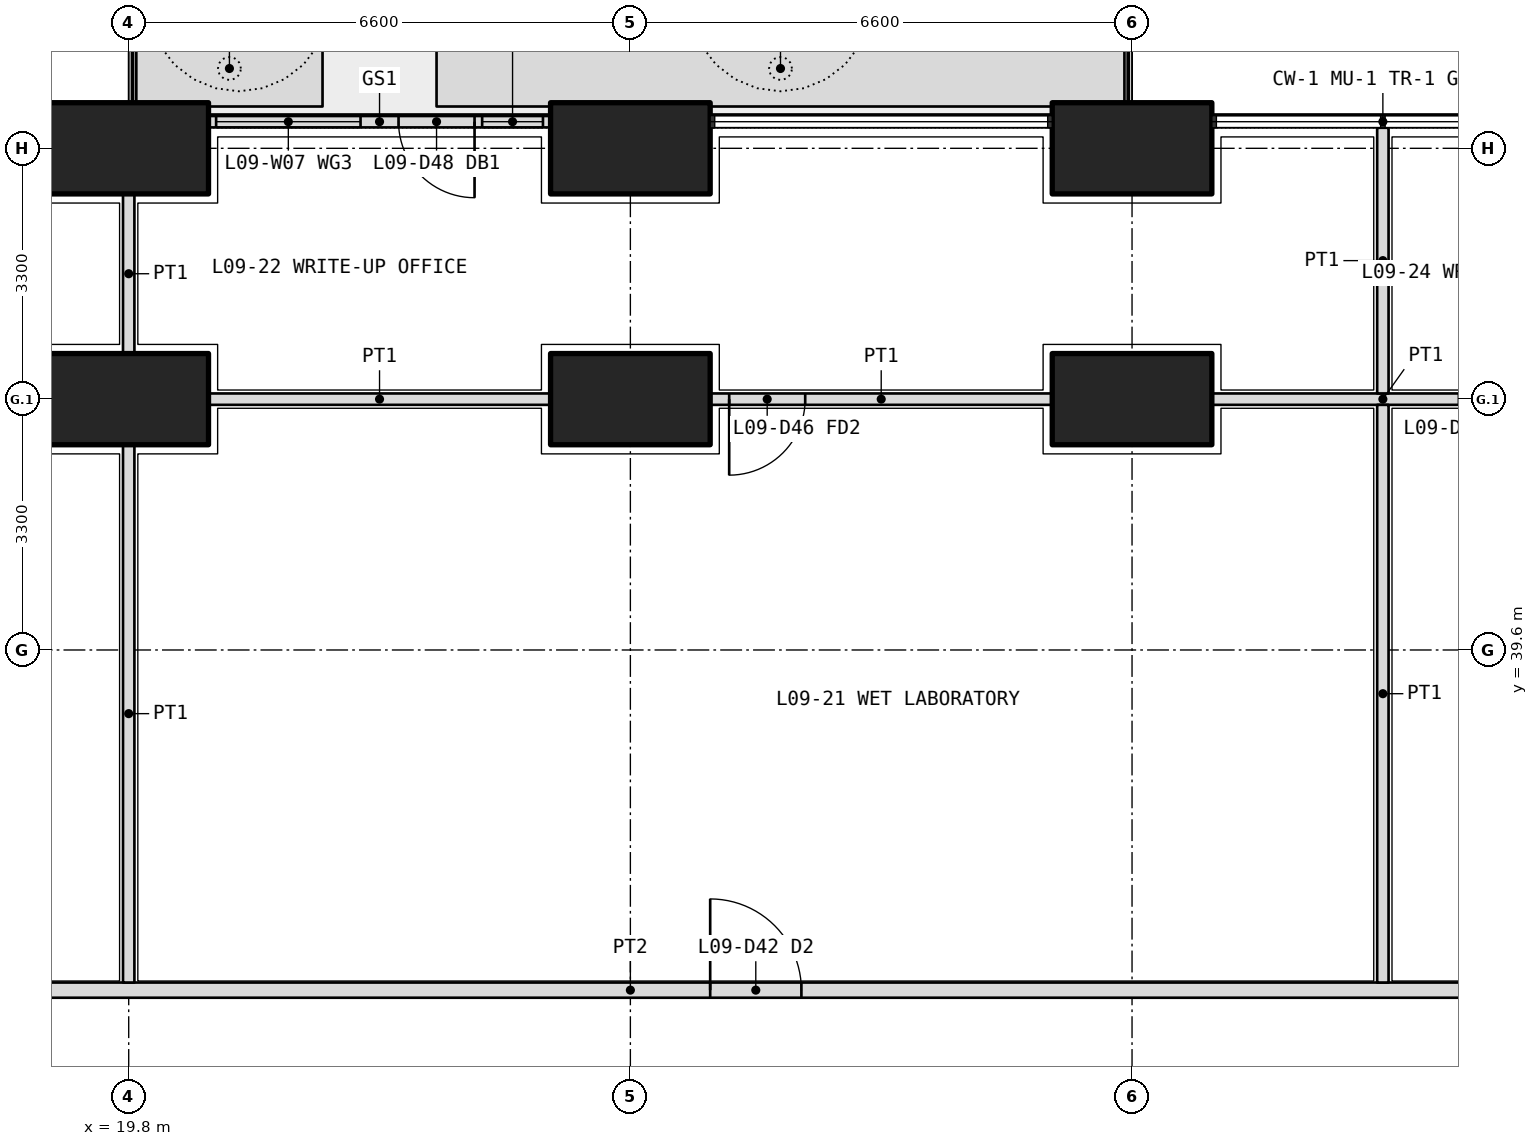
"""IFC4 building model, lengths in metres.
Left out: names, types, materials, properties, quantities, classifications, styles, units other than length and angle.
Written with IfcOpenShell. Run it as: python <this file> out.ifc"""

import sys

from ifc_helpers import new_model, si_unit, direction, frame, frame_2d, origin, origin_2d, place, context, subcontext, project, spatial, polyline, rectangle, outline, extrude, element, fill, save


model = new_model("IFC4")
c1 = context("Model", 3, precision=1e-05, world=origin(), true_north=direction((0.0, 1.0)))
c2 = subcontext(c1, "Body", "Model", "MODEL_VIEW")
j1 = project(units=[si_unit("LENGTHUNIT", "METRE"), si_unit("PLANEANGLEUNIT", "RADIAN")], contexts=[c1])
p1 = place(None, origin())
s1 = spatial("IfcSite", under=j1, at=p1, CompositionType="ELEMENT")
p2 = place(p1, origin())
s2 = spatial("IfcBuilding", under=s1, at=p2, CompositionType="ELEMENT")
p3 = place(p2, frame((0.0, 0.0, 42.3)))
s3 = spatial("IfcBuildingStorey", under=s2, at=p3, CompositionType="ELEMENT", Elevation=42.3)
for number, where, z_axis, x_axis in (
    (1, (19.8, 46.2, 0.0), (0.0, 0.0, 1.0), (1.0, 0.0, 0.0)),
    (2, (26.4, 46.2, 0.0), (0.0, 0.0, 1.0), (1.0, 0.0, 0.0)),
    (3, (33.0, 46.2, 0.0), (0.0, 0.0, 1.0), (1.0, 0.0, 0.0)),
    (4, (19.8, 42.9, 0.0), (0.0, 0.0, 1.0), (1.0, 0.0, 0.0)),
    (5, (26.4, 42.9, 0.0), (0.0, 0.0, 1.0), (1.0, 0.0, 0.0)),
    (6, (33.0, 42.9, 0.0), (0.0, 0.0, 1.0), (1.0, 0.0, 0.0)),
):
    element("IfcColumn", number, at=place(p3, frame(where, z_axis=z_axis, x_axis=x_axis)), inside=s3, PredefinedType="COLUMN", context=c2, shape_type="SweptSolid", body=[
        extrude(rectangle(XDim=2.1, YDim=1.2, at=origin_2d()), origin(), (0.0, 0.0, 1.0), 4.2),
    ])
p4 = place(p3, origin())
e7 = element("IfcWall", 7, at=p4, inside=s3, PredefinedType="USERDEFINED", context=c2, shape_type="SweptSolid", body=[
    extrude(outline(polyline([(19.9, 46.75), (22.35, 46.75), (22.35, 47.75), (19.9, 47.75), (19.9, 46.75)]), holes=[polyline([(20.05, 46.9), (22.2, 46.9), (22.2, 47.6), (20.05, 47.6), (20.05, 46.9)])]), origin(), (0.0, 0.0, 1.0), 1.05),
])
p5 = place(p3, origin())
e8 = element("IfcWall", 8, at=p5, inside=s3, PredefinedType="USERDEFINED", context=c2, shape_type="SweptSolid", body=[
    extrude(outline(polyline([(23.85, 46.75), (32.9, 46.75), (32.9, 47.75), (23.85, 47.75), (23.85, 46.75)]), holes=[polyline([(24.0, 46.9), (32.75, 46.9), (32.75, 47.6), (24.0, 47.6), (24.0, 46.9)])]), origin(), (0.0, 0.0, 1.0), 1.05),
])
p6 = place(p3, frame((25.35, 46.55, 0.0), z_axis=(0.0, 0.0, 1.0), x_axis=(-1.0, 0.0, 0.0)))
e9 = element("IfcWall", 9, at=p6, inside=s3, PredefinedType="SOLIDWALL", context=c2, shape_type="SweptSolid", body=[
    extrude(rectangle(XDim=4.5, YDim=0.15, at=frame_2d((2.25, 0.0))), origin(), (0.0, 0.0, 1.0), 2.7),
])
p7 = place(p6, frame((1.0, 0.0, 0.0)))
e10 = element("IfcOpeningElement", 10, at=p7, cuts=e9, PredefinedType="OPENING", context=c2, shape_type="SweptSolid", body=[
    extrude(rectangle(XDim=1.0, YDim=2.4, at=frame_2d((0.5, 1.2))), frame((0.0, 0.085, 0.0), z_axis=(0.0, -1.0, 0.0), x_axis=(1.0, 0.0, 0.0)), (0.0, 0.0, 1.0), 0.17),
])
p8 = place(p6, frame((0.1, 0.0, 0.1)))
e11 = element("IfcOpeningElement", 11, at=p8, cuts=e9, PredefinedType="OPENING", context=c2, shape_type="SweptSolid", body=[
    extrude(rectangle(XDim=0.8, YDim=2.3, at=frame_2d((0.4, 1.15))), frame((0.0, 0.085, 0.0), z_axis=(0.0, -1.0, 0.0), x_axis=(1.0, 0.0, 0.0)), (0.0, 0.0, 1.0), 0.17),
])
p9 = place(p6, frame((2.5, 0.0, 0.1)))
e12 = element("IfcOpeningElement", 12, at=p9, cuts=e9, PredefinedType="OPENING", context=c2, shape_type="SweptSolid", body=[
    extrude(rectangle(XDim=1.9, YDim=2.3, at=frame_2d((0.95, 1.15))), frame((0.0, 0.085, 0.0), z_axis=(0.0, -1.0, 0.0), x_axis=(1.0, 0.0, 0.0)), (0.0, 0.0, 1.0), 0.17),
])
p10 = place(p3, frame((10.975, 35.125, 0.0), z_axis=(0.0, 0.0, 1.0), x_axis=(1.0, 0.0, 0.0)))
e13 = element("IfcWall", 13, at=p10, inside=s3, PredefinedType="PARTITIONING", context=c2, shape_type="SweptSolid", body=[
    extrude(rectangle(XDim=30.85, YDim=0.2, at=frame_2d((15.425, 0.0))), origin(), (0.0, 0.0, 1.0), 2.85),
])
p11 = place(p10, frame((3.962, 0.0, 0.0)))
e14 = element("IfcOpeningElement", 14, at=p11, cuts=e13, PredefinedType="OPENING", context=c2, shape_type="SweptSolid", body=[
    extrude(rectangle(XDim=1.0, YDim=2.1, at=frame_2d((0.5, 1.05))), frame((0.0, 0.11, 0.0), z_axis=(0.0, -1.0, 0.0), x_axis=(1.0, 0.0, 0.0)), (0.0, 0.0, 1.0), 0.22),
])
p12 = place(p10, frame((16.475, 0.0, 0.0)))
e15 = element("IfcOpeningElement", 15, at=p12, cuts=e13, PredefinedType="OPENING", context=c2, shape_type="SweptSolid", body=[
    extrude(rectangle(XDim=1.2, YDim=2.1, at=frame_2d((0.6, 1.05))), frame((0.0, 0.11, 0.0), z_axis=(0.0, -1.0, 0.0), x_axis=(1.0, 0.0, 0.0)), (0.0, 0.0, 1.0), 0.22),
])
p13 = place(p10, frame((27.438, 0.0, 0.0)))
e16 = element("IfcOpeningElement", 16, at=p13, cuts=e13, PredefinedType="OPENING", context=c2, shape_type="SweptSolid", body=[
    extrude(rectangle(XDim=1.2, YDim=2.1, at=frame_2d((0.6, 1.05))), frame((0.0, 0.11, 0.0), z_axis=(0.0, -1.0, 0.0), x_axis=(1.0, 0.0, 0.0)), (0.0, 0.0, 1.0), 0.22),
])
p14 = place(p3, frame((38.55, 42.9, 0.0), z_axis=(0.0, 0.0, 1.0), x_axis=(-1.0, 0.0, 0.0)))
e17 = element("IfcWall", 17, at=p14, inside=s3, PredefinedType="PARTITIONING", context=c2, shape_type="SweptSolid", body=[
    extrude(rectangle(XDim=4.5, YDim=0.15, at=frame_2d((2.25, 0.0))), origin(), (0.0, 0.0, 1.0), 3.9),
])
p15 = place(p14, frame((0.25, 0.0, 0.0)))
e18 = element("IfcOpeningElement", 18, at=p15, cuts=e17, PredefinedType="OPENING", context=c2, shape_type="SweptSolid", body=[
    extrude(rectangle(XDim=1.0, YDim=2.1, at=frame_2d((0.5, 1.05))), frame((0.0, 0.085, 0.0), z_axis=(0.0, -1.0, 0.0), x_axis=(1.0, 0.0, 0.0)), (0.0, 0.0, 1.0), 0.17),
])
p16 = place(p3, frame((31.95, 42.9, 0.0), z_axis=(0.0, 0.0, 1.0), x_axis=(-1.0, 0.0, 0.0)))
e19 = element("IfcWall", 19, at=p16, inside=s3, PredefinedType="PARTITIONING", context=c2, shape_type="SweptSolid", body=[
    extrude(rectangle(XDim=4.5, YDim=0.15, at=frame_2d((2.25, 0.0))), origin(), (0.0, 0.0, 1.0), 3.9),
])
p17 = place(p16, frame((3.25, 0.0, 0.0)))
e20 = element("IfcOpeningElement", 20, at=p17, cuts=e19, PredefinedType="OPENING", context=c2, shape_type="SweptSolid", body=[
    extrude(rectangle(XDim=1.0, YDim=2.1, at=frame_2d((0.5, 1.05))), frame((0.0, 0.085, 0.0), z_axis=(0.0, -1.0, 0.0), x_axis=(1.0, 0.0, 0.0)), (0.0, 0.0, 1.0), 0.17),
])
p18 = place(p3, frame((25.35, 42.9, 0.0), z_axis=(0.0, 0.0, 1.0), x_axis=(-1.0, 0.0, 0.0)))
e21 = element("IfcWall", 21, at=p18, inside=s3, PredefinedType="PARTITIONING", context=c2, shape_type="SweptSolid", body=[
    extrude(rectangle(XDim=4.5, YDim=0.15, at=frame_2d((2.25, 0.0))), origin(), (0.0, 0.0, 1.0), 3.9),
])
p19 = place(p3, frame((19.8, 45.6, 0.0), z_axis=(0.0, 0.0, 1.0), x_axis=(0.0, -1.0, 0.0)))
e22 = element("IfcWall", 22, at=p19, inside=s3, PredefinedType="PARTITIONING", context=c2, shape_type="SweptSolid", body=[
    extrude(rectangle(XDim=2.1, YDim=0.15, at=frame_2d((1.05, 0.0))), origin(), (0.0, 0.0, 1.0), 2.85),
])
p20 = place(p3, frame((19.8, 42.3, 0.0), z_axis=(0.0, 0.0, 1.0), x_axis=(0.0, -1.0, 0.0)))
e23 = element("IfcWall", 23, at=p20, inside=s3, PredefinedType="PARTITIONING", context=c2, shape_type="SweptSolid", body=[
    extrude(rectangle(XDim=7.075, YDim=0.15, at=frame_2d((3.538, 0.0))), origin(), (0.0, 0.0, 1.0), 2.85),
])
p21 = place(p3, frame((36.3, 46.47, 0.0), z_axis=(0.0, 0.0, 1.0), x_axis=(0.0, -1.0, 0.0)))
e24 = element("IfcWall", 24, at=p21, inside=s3, PredefinedType="PARTITIONING", context=c2, shape_type="SweptSolid", body=[
    extrude(rectangle(XDim=3.495, YDim=0.15, at=frame_2d((1.748, 0.0))), origin(), (0.0, 0.0, 1.0), 2.7),
])
p22 = place(p3, frame((36.3, 42.825, 0.0), z_axis=(0.0, 0.0, 1.0), x_axis=(0.0, -1.0, 0.0)))
e25 = element("IfcWall", 25, at=p22, inside=s3, PredefinedType="PARTITIONING", context=c2, shape_type="SweptSolid", body=[
    extrude(rectangle(XDim=7.6, YDim=0.15, at=frame_2d((3.8, 0.0))), origin(), (0.0, 0.0, 1.0), 3.9),
])
p23 = place(p7, origin())
e26 = element("IfcDoor", 26, at=p23, inside=s3, OperationType="SINGLE_SWING_LEFT", PredefinedType="DOOR", context=c2, shape_type="SweptSolid", body=[
    extrude(rectangle(XDim=1.0, YDim=2.4, at=frame_2d((0.5, 1.2))), frame((0.0, 0.025, 0.0), z_axis=(0.0, -1.0, 0.0), x_axis=(1.0, 0.0, 0.0)), (0.0, 0.0, 1.0), 0.05),
])
fill(e10, e26)
p24 = place(p8, origin())
e27 = element("IfcWindow", 27, at=p24, inside=s3, PartitioningType="SINGLE_PANEL", PredefinedType="WINDOW", context=c2, shape_type="SweptSolid", body=[
    extrude(rectangle(XDim=0.8, YDim=2.3, at=frame_2d((0.4, 1.15))), frame((0.0, 0.03, 0.0), z_axis=(0.0, -1.0, 0.0), x_axis=(1.0, 0.0, 0.0)), (0.0, 0.0, 1.0), 0.06),
])
fill(e11, e27)
p25 = place(p9, origin())
e28 = element("IfcWindow", 28, at=p25, inside=s3, PartitioningType="SINGLE_PANEL", PredefinedType="WINDOW", context=c2, shape_type="SweptSolid", body=[
    extrude(rectangle(XDim=1.9, YDim=2.3, at=frame_2d((0.95, 1.15))), frame((0.0, 0.03, 0.0), z_axis=(0.0, -1.0, 0.0), x_axis=(1.0, 0.0, 0.0)), (0.0, 0.0, 1.0), 0.06),
])
fill(e12, e28)
p26 = place(p12, origin())
e29 = element("IfcDoor", 29, at=p26, inside=s3, OperationType="DOUBLE_DOOR_SINGLE_SWING", PredefinedType="DOOR", context=c2, shape_type="SweptSolid", body=[
    extrude(rectangle(XDim=1.2, YDim=2.1, at=frame_2d((0.6, 1.05))), frame((0.0, 0.025, 0.0), z_axis=(0.0, -1.0, 0.0), x_axis=(1.0, 0.0, 0.0)), (0.0, 0.0, 1.0), 0.05),
])
fill(e15, e29)
p27 = place(p17, origin())
e30 = element("IfcDoor", 30, at=p27, inside=s3, OperationType="SINGLE_SWING_RIGHT", PredefinedType="DOOR", context=c2, shape_type="SweptSolid", body=[
    extrude(rectangle(XDim=1.0, YDim=2.1, at=frame_2d((0.5, 1.05))), frame((0.0, 0.025, 0.0), z_axis=(0.0, -1.0, 0.0), x_axis=(1.0, 0.0, 0.0)), (0.0, 0.0, 1.0), 0.05),
])
fill(e20, e30)
save(model, sys.argv[1])
